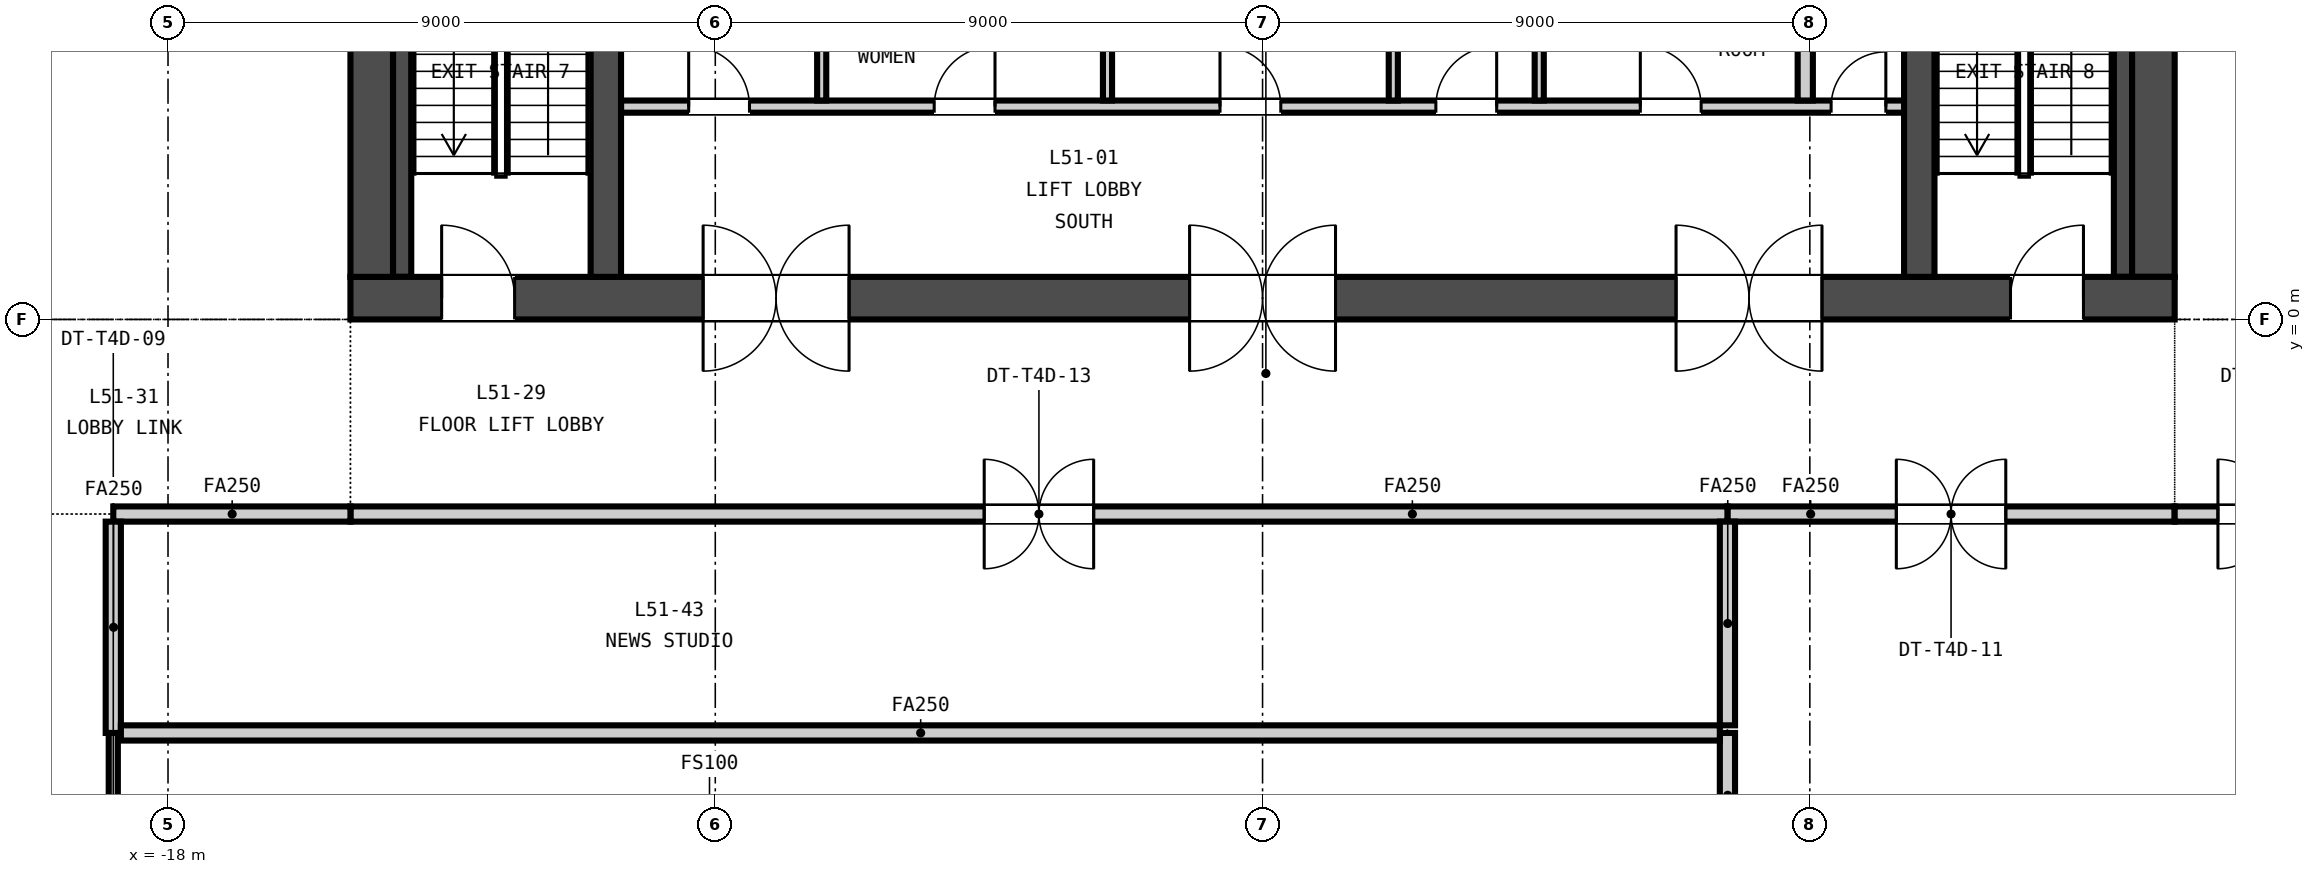
"""IFC4 building model, lengths in metres.
Left out: names, types, materials, properties, quantities, classifications, styles, units other than length and angle.
Written with IfcOpenShell. Run it as: python <this file> out.ifc"""

import sys

from ifc_helpers import new_model, si_unit, direction, frame, frame_2d, origin, place, context, subcontext, project, spatial, rectangle, extrude, element, fill, save


model = new_model("IFC4")
c1 = context("Model", 3, precision=1e-05, world=origin(), true_north=direction((0.0, 1.0)))
c2 = subcontext(c1, "Body", "Model", "MODEL_VIEW")
j1 = project(units=[si_unit("LENGTHUNIT", "METRE"), si_unit("PLANEANGLEUNIT", "RADIAN")], contexts=[c1])
p1 = place(None, origin())
s1 = spatial("IfcSite", under=j1, at=p1, CompositionType="ELEMENT")
p2 = place(p1, origin())
s2 = spatial("IfcBuilding", under=s1, at=p2, CompositionType="ELEMENT")
p3 = place(p2, frame((0.0, 0.0, 203.65)))
s3 = spatial("IfcBuildingStorey", under=s2, at=p3, CompositionType="ELEMENT", Elevation=203.65)
p4 = place(p3, frame((-15.0, 0.35, -0.15), z_axis=(0.0, 0.0, 1.0), x_axis=(1.0, 0.0, 0.0)))
e1 = element("IfcWall", 1, at=p4, inside=s3, PredefinedType="SOLIDWALL", context=c2, shape_type="SweptSolid", body=[
    extrude(rectangle(XDim=30.0, YDim=0.7, at=frame_2d((15.0, 0.0))), origin(), (0.0, 0.0, 1.0), 3.5),
])
p5 = place(p4, frame((5.8, 0.0, 0.15)))
e2 = element("IfcOpeningElement", 2, at=p5, cuts=e1, PredefinedType="OPENING", context=c2, shape_type="SweptSolid", body=[
    extrude(rectangle(XDim=2.4, YDim=2.4, at=frame_2d((1.2, 1.2))), frame((0.0, 0.36, 0.0), z_axis=(0.0, -1.0, 0.0), x_axis=(1.0, 0.0, 0.0)), (0.0, 0.0, 1.0), 0.72),
])
p6 = place(p4, frame((13.8, 0.0, 0.15)))
e3 = element("IfcOpeningElement", 3, at=p6, cuts=e1, PredefinedType="OPENING", context=c2, shape_type="SweptSolid", body=[
    extrude(rectangle(XDim=2.4, YDim=2.4, at=frame_2d((1.2, 1.2))), frame((0.0, 0.36, 0.0), z_axis=(0.0, -1.0, 0.0), x_axis=(1.0, 0.0, 0.0)), (0.0, 0.0, 1.0), 0.72),
])
p7 = place(p4, frame((21.8, 0.0, 0.15)))
e4 = element("IfcOpeningElement", 4, at=p7, cuts=e1, PredefinedType="OPENING", context=c2, shape_type="SweptSolid", body=[
    extrude(rectangle(XDim=2.4, YDim=2.4, at=frame_2d((1.2, 1.2))), frame((0.0, 0.36, 0.0), z_axis=(0.0, -1.0, 0.0), x_axis=(1.0, 0.0, 0.0)), (0.0, 0.0, 1.0), 0.72),
])
p8 = place(p4, frame((1.5, 0.0, 0.15)))
e5 = element("IfcOpeningElement", 5, at=p8, cuts=e1, PredefinedType="OPENING", context=c2, shape_type="SweptSolid", body=[
    extrude(rectangle(XDim=1.2, YDim=2.1, at=frame_2d((0.6, 1.05))), frame((0.0, 0.36, 0.0), z_axis=(0.0, -1.0, 0.0), x_axis=(1.0, 0.0, 0.0)), (0.0, 0.0, 1.0), 0.72),
])
p9 = place(p4, frame((27.3, 0.0, 0.15)))
e6 = element("IfcOpeningElement", 6, at=p9, cuts=e1, PredefinedType="OPENING", context=c2, shape_type="SweptSolid", body=[
    extrude(rectangle(XDim=1.2, YDim=2.1, at=frame_2d((0.6, 1.05))), frame((0.0, 0.36, 0.0), z_axis=(0.0, -1.0, 0.0), x_axis=(1.0, 0.0, 0.0)), (0.0, 0.0, 1.0), 0.72),
])
for number, where, z_axis, x_axis in (
    (7, (-14.65, 0.7, -0.15), (0.0, 0.0, 1.0), (0.0, 1.0, 0.0)),
    (8, (14.65, 0.7, -0.15), (0.0, 0.0, 1.0), (0.0, 1.0, 0.0)),
):
    element("IfcWall", number, at=place(p3, frame(where, z_axis=z_axis, x_axis=x_axis)), inside=s3, PredefinedType="SOLIDWALL", context=c2, shape_type="SweptSolid", body=[
        extrude(rectangle(XDim=13.6, YDim=0.7, at=frame_2d((6.8, 0.0))), origin(), (0.0, 0.0, 1.0), 3.5),
    ])
for number, where, z_axis, x_axis in (
    (9, (-10.8, 0.7, -0.15), (0.0, 0.0, 1.0), (0.0, 1.0, 0.0)),
    (10, (10.8, 0.7, -0.15), (0.0, 0.0, 1.0), (0.0, 1.0, 0.0)),
):
    element("IfcWall", number, at=place(p3, frame(where, z_axis=z_axis, x_axis=x_axis)), inside=s3, PredefinedType="SOLIDWALL", context=c2, shape_type="SweptSolid", body=[
        extrude(rectangle(XDim=13.6, YDim=0.5, at=frame_2d((6.8, 0.0))), origin(), (0.0, 0.0, 1.0), 3.5),
    ])
p10 = place(p3, frame((-10.55, 3.5, 0.0), z_axis=(0.0, 0.0, 1.0), x_axis=(1.0, 0.0, 0.0)))
e11 = element("IfcWall", 11, at=p10, inside=s3, PredefinedType="PARTITIONING", context=c2, shape_type="SweptSolid", body=[
    extrude(rectangle(XDim=21.1, YDim=0.2, at=frame_2d((10.55, 0.0))), origin(), (0.0, 0.0, 1.0), 3.35),
])
p11 = place(p10, frame((1.113, 0.0, 0.0)))
e12 = element("IfcOpeningElement", 12, at=p11, cuts=e11, PredefinedType="OPENING", context=c2, shape_type="SweptSolid", body=[
    extrude(rectangle(XDim=1.0, YDim=2.1, at=frame_2d((0.5, 1.05))), frame((0.0, 0.11, 0.0), z_axis=(0.0, -1.0, 0.0), x_axis=(1.0, 0.0, 0.0)), (0.0, 0.0, 1.0), 0.22),
])
p12 = place(p10, frame((5.15, 0.0, 0.0)))
e13 = element("IfcOpeningElement", 13, at=p12, cuts=e11, PredefinedType="OPENING", context=c2, shape_type="SweptSolid", body=[
    extrude(rectangle(XDim=1.0, YDim=2.1, at=frame_2d((0.5, 1.05))), frame((0.0, 0.11, 0.0), z_axis=(0.0, -1.0, 0.0), x_axis=(1.0, 0.0, 0.0)), (0.0, 0.0, 1.0), 0.22),
])
p13 = place(p10, frame((9.85, 0.0, 0.0)))
e14 = element("IfcOpeningElement", 14, at=p13, cuts=e11, PredefinedType="OPENING", context=c2, shape_type="SweptSolid", body=[
    extrude(rectangle(XDim=1.0, YDim=2.1, at=frame_2d((0.5, 1.05))), frame((0.0, 0.11, 0.0), z_axis=(0.0, -1.0, 0.0), x_axis=(1.0, 0.0, 0.0)), (0.0, 0.0, 1.0), 0.22),
])
p14 = place(p10, frame((13.4, 0.0, 0.0)))
e15 = element("IfcOpeningElement", 15, at=p14, cuts=e11, PredefinedType="OPENING", context=c2, shape_type="SweptSolid", body=[
    extrude(rectangle(XDim=1.0, YDim=2.1, at=frame_2d((0.5, 1.05))), frame((0.0, 0.11, 0.0), z_axis=(0.0, -1.0, 0.0), x_axis=(1.0, 0.0, 0.0)), (0.0, 0.0, 1.0), 0.22),
])
p15 = place(p10, frame((16.762, 0.0, 0.0)))
e16 = element("IfcOpeningElement", 16, at=p15, cuts=e11, PredefinedType="OPENING", context=c2, shape_type="SweptSolid", body=[
    extrude(rectangle(XDim=1.0, YDim=2.1, at=frame_2d((0.5, 1.05))), frame((0.0, 0.11, 0.0), z_axis=(0.0, -1.0, 0.0), x_axis=(1.0, 0.0, 0.0)), (0.0, 0.0, 1.0), 0.22),
])
p16 = place(p10, frame((19.9, 0.0, 0.0)))
e17 = element("IfcOpeningElement", 17, at=p16, cuts=e11, PredefinedType="OPENING", context=c2, shape_type="SweptSolid", body=[
    extrude(rectangle(XDim=0.9, YDim=2.1, at=frame_2d((0.45, 1.05))), frame((0.0, 0.11, 0.0), z_axis=(0.0, -1.0, 0.0), x_axis=(1.0, 0.0, 0.0)), (0.0, 0.0, 1.0), 0.22),
])
for number, where, z_axis, x_axis in (
    (18, (-7.25, 3.6, 0.0), (0.0, 0.0, 1.0), (0.0, 1.0, 0.0)),
    (19, (-2.55, 3.6, 0.0), (0.0, 0.0, 1.0), (0.0, 1.0, 0.0)),
    (20, (2.15, 3.6, 0.0), (0.0, 0.0, 1.0), (0.0, 1.0, 0.0)),
    (21, (4.55, 3.6, 0.0), (0.0, 0.0, 1.0), (0.0, 1.0, 0.0)),
):
    element("IfcWall", number, at=place(p3, frame(where, z_axis=z_axis, x_axis=x_axis)), inside=s3, PredefinedType="PARTITIONING", context=c2, shape_type="SweptSolid", body=[
        extrude(rectangle(XDim=2.3, YDim=0.15, at=frame_2d((1.15, 0.0))), origin(), (0.0, 0.0, 1.0), 3.35),
    ])
p17 = place(p3, frame((8.925, 3.6, 0.0), z_axis=(0.0, 0.0, 1.0), x_axis=(0.0, 1.0, 0.0)))
e22 = element("IfcWall", 22, at=p17, inside=s3, PredefinedType="PARTITIONING", context=c2, shape_type="SweptSolid", body=[
    extrude(rectangle(XDim=2.3, YDim=0.25, at=frame_2d((1.15, 0.0))), origin(), (0.0, 0.0, 1.0), 3.35),
])
for number, where, z_axis, x_axis in (
    (23, (-14.15, 0.7, 0.0), (0.0, 0.0, 1.0), (0.0, 1.0, 0.0)),
    (24, (14.15, 0.7, 0.0), (0.0, 0.0, 1.0), (0.0, 1.0, 0.0)),
):
    element("IfcWall", number, at=place(p3, frame(where, z_axis=z_axis, x_axis=x_axis)), inside=s3, PredefinedType="SOLIDWALL", context=c2, shape_type="SweptSolid", body=[
        extrude(rectangle(XDim=13.6, YDim=0.3, at=frame_2d((6.8, 0.0))), origin(), (0.0, 0.0, 1.0), 3.35),
    ])
p18 = place(p3, frame((15.0, -3.2, 0.0), z_axis=(0.0, 0.0, 1.0), x_axis=(-1.0, 0.0, 0.0)))
e25 = element("IfcWall", 25, at=p18, inside=s3, PredefinedType="PARTITIONING", context=c2, shape_type="SweptSolid", body=[
    extrude(rectangle(XDim=7.355, YDim=0.25, at=frame_2d((3.677, 0.0))), origin(), (0.0, 0.0, 1.0), 2.591),
])
p19 = place(p18, frame((2.778, 0.0, 0.0)))
e26 = element("IfcOpeningElement", 26, at=p19, cuts=e25, PredefinedType="OPENING", context=c2, shape_type="SweptSolid", body=[
    extrude(rectangle(XDim=1.8, YDim=2.1, at=frame_2d((0.9, 1.05))), frame((0.0, 0.135, 0.0), z_axis=(0.0, -1.0, 0.0), x_axis=(1.0, 0.0, 0.0)), (0.0, 0.0, 1.0), 0.27),
])
p20 = place(p3, frame((7.645, -3.2, 0.0), z_axis=(0.0, 0.0, 1.0), x_axis=(-1.0, 0.0, 0.0)))
e27 = element("IfcWall", 27, at=p20, inside=s3, PredefinedType="PARTITIONING", context=c2, shape_type="SweptSolid", body=[
    extrude(rectangle(XDim=22.645, YDim=0.25, at=frame_2d((11.323, 0.0))), origin(), (0.0, 0.0, 1.0), 2.591),
])
p21 = place(p20, frame((10.423, 0.0, 0.0)))
e28 = element("IfcOpeningElement", 28, at=p21, cuts=e27, PredefinedType="OPENING", context=c2, shape_type="SweptSolid", body=[
    extrude(rectangle(XDim=1.8, YDim=2.1, at=frame_2d((0.9, 1.05))), frame((0.0, 0.135, 0.0), z_axis=(0.0, -1.0, 0.0), x_axis=(1.0, 0.0, 0.0)), (0.0, 0.0, 1.0), 0.27),
])
p22 = place(p3, frame((18.223, -3.2, 0.0), z_axis=(0.0, 0.0, 1.0), x_axis=(-1.0, 0.0, 0.0)))
e29 = element("IfcWall", 29, at=p22, inside=s3, PredefinedType="PARTITIONING", context=c2, shape_type="SweptSolid", body=[
    extrude(rectangle(XDim=3.223, YDim=0.25, at=frame_2d((1.611, 0.0))), origin(), (0.0, 0.0, 1.0), 2.591),
])
p23 = place(p22, frame((0.711, 0.0, 0.0)))
e30 = element("IfcOpeningElement", 30, at=p23, cuts=e29, PredefinedType="OPENING", context=c2, shape_type="SweptSolid", body=[
    extrude(rectangle(XDim=1.8, YDim=2.1, at=frame_2d((0.9, 1.05))), frame((0.0, 0.135, 0.0), z_axis=(0.0, -1.0, 0.0), x_axis=(1.0, 0.0, 0.0)), (0.0, 0.0, 1.0), 0.27),
])
p24 = place(p3, frame((-15.0, -3.2, 0.0), z_axis=(0.0, 0.0, 1.0), x_axis=(-1.0, 0.0, 0.0)))
e31 = element("IfcWall", 31, at=p24, inside=s3, PredefinedType="PARTITIONING", context=c2, shape_type="SweptSolid", body=[
    extrude(rectangle(XDim=3.9, YDim=0.25, at=frame_2d((1.95, 0.0))), origin(), (0.0, 0.0, 1.0), 2.591),
])
p25 = place(p3, frame((-18.9, -6.8, 0.0), z_axis=(0.0, 0.0, 1.0), x_axis=(0.0, -1.0, 0.0)))
e32 = element("IfcWall", 32, at=p25, inside=s3, PredefinedType="PARTITIONING", context=c2, shape_type="SweptSolid", body=[
    extrude(rectangle(XDim=8.325, YDim=0.15, at=frame_2d((4.163, 0.0))), origin(), (0.0, 0.0, 1.0), 2.591),
])
p26 = place(p25, frame((3.262, 0.0, 0.0)))
e33 = element("IfcOpeningElement", 33, at=p26, cuts=e32, PredefinedType="OPENING", context=c2, shape_type="SweptSolid", body=[
    extrude(rectangle(XDim=1.8, YDim=2.1, at=frame_2d((0.9, 1.05))), frame((0.0, 0.085, 0.0), z_axis=(0.0, -1.0, 0.0), x_axis=(1.0, 0.0, 0.0)), (0.0, 0.0, 1.0), 0.17),
])
p27 = place(p3, frame((-18.9, -3.325, 0.0), z_axis=(0.0, 0.0, 1.0), x_axis=(0.0, -1.0, 0.0)))
e34 = element("IfcWall", 34, at=p27, inside=s3, PredefinedType="PARTITIONING", context=c2, shape_type="SweptSolid", body=[
    extrude(rectangle(XDim=3.475, YDim=0.25, at=frame_2d((1.738, 0.0))), origin(), (0.0, 0.0, 1.0), 2.591),
])
p28 = place(p3, frame((7.645, -8.85, 0.0), z_axis=(0.0, 0.0, 1.0), x_axis=(0.0, 1.0, 0.0)))
e35 = element("IfcWall", 35, at=p28, inside=s3, PredefinedType="PARTITIONING", context=c2, shape_type="SweptSolid", body=[
    extrude(rectangle(XDim=2.05, YDim=0.25, at=frame_2d((1.025, 0.0))), origin(), (0.0, 0.0, 1.0), 2.591),
])
p29 = place(p3, frame((-18.775, -6.8, 0.0), z_axis=(0.0, 0.0, 1.0), x_axis=(1.0, 0.0, 0.0)))
e36 = element("IfcWall", 36, at=p29, inside=s3, PredefinedType="PARTITIONING", context=c2, shape_type="SweptSolid", body=[
    extrude(rectangle(XDim=26.295, YDim=0.25, at=frame_2d((13.147, 0.0))), origin(), (0.0, 0.0, 1.0), 2.591),
])
p30 = place(p3, frame((7.645, -6.675, 0.0), z_axis=(0.0, 0.0, 1.0), x_axis=(0.0, 1.0, 0.0)))
e37 = element("IfcWall", 37, at=p30, inside=s3, PredefinedType="PARTITIONING", context=c2, shape_type="SweptSolid", body=[
    extrude(rectangle(XDim=3.35, YDim=0.25, at=frame_2d((1.675, 0.0))), origin(), (0.0, 0.0, 1.0), 2.591),
])
p31 = place(p11, origin())
e38 = element("IfcDoor", 38, at=p31, inside=s3, OperationType="SINGLE_SWING_LEFT", PredefinedType="DOOR", context=c2, shape_type="SweptSolid", body=[
    extrude(rectangle(XDim=1.0, YDim=2.1, at=frame_2d((0.5, 1.05))), frame((0.0, 0.025, 0.0), z_axis=(0.0, -1.0, 0.0), x_axis=(1.0, 0.0, 0.0)), (0.0, 0.0, 1.0), 0.05),
])
fill(e12, e38)
p32 = place(p12, origin())
e39 = element("IfcDoor", 39, at=p32, inside=s3, OperationType="SINGLE_SWING_RIGHT", PredefinedType="DOOR", context=c2, shape_type="SweptSolid", body=[
    extrude(rectangle(XDim=1.0, YDim=2.1, at=frame_2d((0.5, 1.05))), frame((0.0, 0.025, 0.0), z_axis=(0.0, -1.0, 0.0), x_axis=(1.0, 0.0, 0.0)), (0.0, 0.0, 1.0), 0.05),
])
fill(e13, e39)
p33 = place(p13, origin())
e40 = element("IfcDoor", 40, at=p33, inside=s3, OperationType="SINGLE_SWING_LEFT", PredefinedType="DOOR", context=c2, shape_type="SweptSolid", body=[
    extrude(rectangle(XDim=1.0, YDim=2.1, at=frame_2d((0.5, 1.05))), frame((0.0, 0.025, 0.0), z_axis=(0.0, -1.0, 0.0), x_axis=(1.0, 0.0, 0.0)), (0.0, 0.0, 1.0), 0.05),
])
fill(e14, e40)
p34 = place(p14, origin())
e41 = element("IfcDoor", 41, at=p34, inside=s3, OperationType="SINGLE_SWING_RIGHT", PredefinedType="DOOR", context=c2, shape_type="SweptSolid", body=[
    extrude(rectangle(XDim=1.0, YDim=2.1, at=frame_2d((0.5, 1.05))), frame((0.0, 0.025, 0.0), z_axis=(0.0, -1.0, 0.0), x_axis=(1.0, 0.0, 0.0)), (0.0, 0.0, 1.0), 0.05),
])
fill(e15, e41)
p35 = place(p15, origin())
e42 = element("IfcDoor", 42, at=p35, inside=s3, OperationType="SINGLE_SWING_LEFT", PredefinedType="DOOR", context=c2, shape_type="SweptSolid", body=[
    extrude(rectangle(XDim=1.0, YDim=2.1, at=frame_2d((0.5, 1.05))), frame((0.0, 0.025, 0.0), z_axis=(0.0, -1.0, 0.0), x_axis=(1.0, 0.0, 0.0)), (0.0, 0.0, 1.0), 0.05),
])
fill(e16, e42)
p36 = place(p16, origin())
e43 = element("IfcDoor", 43, at=p36, inside=s3, OperationType="SINGLE_SWING_RIGHT", PredefinedType="DOOR", context=c2, shape_type="SweptSolid", body=[
    extrude(rectangle(XDim=0.9, YDim=2.1, at=frame_2d((0.45, 1.05))), frame((0.0, 0.025, 0.0), z_axis=(0.0, -1.0, 0.0), x_axis=(1.0, 0.0, 0.0)), (0.0, 0.0, 1.0), 0.05),
])
fill(e17, e43)
p37 = place(p5, origin())
e44 = element("IfcDoor", 44, at=p37, inside=s3, OperationType="DOUBLE_DOOR_DOUBLE_SWING", PredefinedType="DOOR", context=c2, shape_type="SweptSolid", body=[
    extrude(rectangle(XDim=2.4, YDim=2.4, at=frame_2d((1.2, 1.2))), frame((0.0, 0.025, 0.0), z_axis=(0.0, -1.0, 0.0), x_axis=(1.0, 0.0, 0.0)), (0.0, 0.0, 1.0), 0.05),
])
fill(e2, e44)
p38 = place(p6, origin())
e45 = element("IfcDoor", 45, at=p38, inside=s3, OperationType="DOUBLE_DOOR_DOUBLE_SWING", PredefinedType="DOOR", context=c2, shape_type="SweptSolid", body=[
    extrude(rectangle(XDim=2.4, YDim=2.4, at=frame_2d((1.2, 1.2))), frame((0.0, 0.025, 0.0), z_axis=(0.0, -1.0, 0.0), x_axis=(1.0, 0.0, 0.0)), (0.0, 0.0, 1.0), 0.05),
])
fill(e3, e45)
p39 = place(p7, origin())
e46 = element("IfcDoor", 46, at=p39, inside=s3, OperationType="DOUBLE_DOOR_DOUBLE_SWING", PredefinedType="DOOR", context=c2, shape_type="SweptSolid", body=[
    extrude(rectangle(XDim=2.4, YDim=2.4, at=frame_2d((1.2, 1.2))), frame((0.0, 0.025, 0.0), z_axis=(0.0, -1.0, 0.0), x_axis=(1.0, 0.0, 0.0)), (0.0, 0.0, 1.0), 0.05),
])
fill(e4, e46)
p40 = place(p8, origin())
e47 = element("IfcDoor", 47, at=p40, inside=s3, OperationType="SINGLE_SWING_LEFT", PredefinedType="DOOR", context=c2, shape_type="SweptSolid", body=[
    extrude(rectangle(XDim=1.2, YDim=2.1, at=frame_2d((0.6, 1.05))), frame((0.0, 0.025, 0.0), z_axis=(0.0, -1.0, 0.0), x_axis=(1.0, 0.0, 0.0)), (0.0, 0.0, 1.0), 0.05),
])
fill(e5, e47)
p41 = place(p9, origin())
e48 = element("IfcDoor", 48, at=p41, inside=s3, OperationType="SINGLE_SWING_RIGHT", PredefinedType="DOOR", context=c2, shape_type="SweptSolid", body=[
    extrude(rectangle(XDim=1.2, YDim=2.1, at=frame_2d((0.6, 1.05))), frame((0.0, 0.025, 0.0), z_axis=(0.0, -1.0, 0.0), x_axis=(1.0, 0.0, 0.0)), (0.0, 0.0, 1.0), 0.05),
])
fill(e6, e48)
p42 = place(p19, origin())
e49 = element("IfcDoor", 49, at=p42, inside=s3, OperationType="DOUBLE_DOOR_DOUBLE_SWING", PredefinedType="DOOR", context=c2, shape_type="SweptSolid", body=[
    extrude(rectangle(XDim=1.8, YDim=2.1, at=frame_2d((0.9, 1.05))), frame((0.0, 0.025, 0.0), z_axis=(0.0, -1.0, 0.0), x_axis=(1.0, 0.0, 0.0)), (0.0, 0.0, 1.0), 0.05),
])
fill(e26, e49)
p43 = place(p23, origin())
e50 = element("IfcDoor", 50, at=p43, inside=s3, OperationType="DOUBLE_DOOR_DOUBLE_SWING", PredefinedType="DOOR", context=c2, shape_type="SweptSolid", body=[
    extrude(rectangle(XDim=1.8, YDim=2.1, at=frame_2d((0.9, 1.05))), frame((0.0, 0.025, 0.0), z_axis=(0.0, -1.0, 0.0), x_axis=(1.0, 0.0, 0.0)), (0.0, 0.0, 1.0), 0.05),
])
fill(e30, e50)
p44 = place(p21, origin())
e51 = element("IfcDoor", 51, at=p44, inside=s3, OperationType="DOUBLE_DOOR_DOUBLE_SWING", PredefinedType="DOOR", context=c2, shape_type="SweptSolid", body=[
    extrude(rectangle(XDim=1.8, YDim=2.1, at=frame_2d((0.9, 1.05))), frame((0.0, 0.025, 0.0), z_axis=(0.0, -1.0, 0.0), x_axis=(1.0, 0.0, 0.0)), (0.0, 0.0, 1.0), 0.05),
])
fill(e28, e51)
save(model, sys.argv[1])
